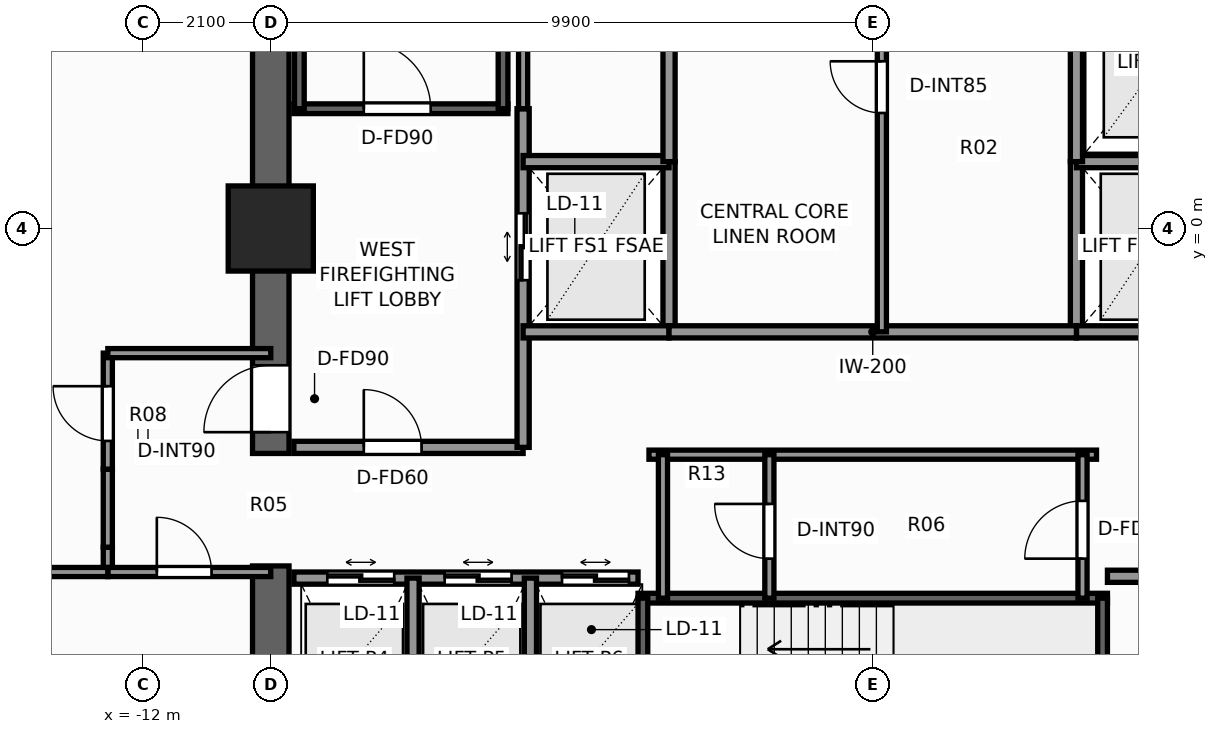
"""IFC4 building model, lengths in metres.
Left out: names, types, materials, properties, quantities, classifications, styles, units other than length and angle.
Written with IfcOpenShell. Run it as: python <this file> out.ifc"""

import sys

from ifc_helpers import new_model, si_unit, direction, frame, frame_2d, origin, origin_2d, place, context, subcontext, project, spatial, rectangle, extrude, element, fill, save


model = new_model("IFC4")
c1 = context("Model", 3, precision=1e-05, world=origin(), true_north=direction((0.0, 1.0)))
c2 = subcontext(c1, "Body", "Model", "MODEL_VIEW")
j1 = project(units=[si_unit("LENGTHUNIT", "METRE"), si_unit("PLANEANGLEUNIT", "RADIAN")], contexts=[c1])
p1 = place(None, origin())
s1 = spatial("IfcSite", under=j1, at=p1, CompositionType="ELEMENT")
p2 = place(p1, origin())
s2 = spatial("IfcBuilding", under=s1, at=p2, CompositionType="ELEMENT")
p3 = place(p2, frame((0.0, 0.0, 85.4)))
s3 = spatial("IfcBuildingStorey", under=s2, at=p3, CompositionType="ELEMENT", Elevation=85.4)
p4 = place(p3, frame((-9.9, -9.6, 0.0), z_axis=(0.0, 0.0, 1.0), x_axis=(0.0, 1.0, 0.0)))
e1 = element("IfcWall", 1, at=p4, inside=s3, PredefinedType="SHEAR", context=c2, shape_type="SweptSolid", body=[
    extrude(rectangle(XDim=4.05, YDim=0.6, at=frame_2d((2.025, 0.0))), origin(), (0.0, 0.0, 1.0), 3.3),
])
p5 = place(p3, frame((-9.9, -3.7, 0.0), z_axis=(0.0, 0.0, 1.0), x_axis=(0.0, 1.0, 0.0)))
e2 = element("IfcWall", 2, at=p5, inside=s3, PredefinedType="SHEAR", context=c2, shape_type="SweptSolid", body=[
    extrude(rectangle(XDim=13.3, YDim=0.6, at=frame_2d((6.65, 0.0))), origin(), (0.0, 0.0, 1.0), 3.3),
])
p6 = place(p5, frame((0.35, 0.0, 0.0)))
e3 = element("IfcOpeningElement", 3, at=p6, cuts=e2, PredefinedType="OPENING", context=c2, shape_type="SweptSolid", body=[
    extrude(rectangle(XDim=1.1, YDim=2.2, at=frame_2d((0.55, 1.1))), frame((0.0, 0.31, 0.0), z_axis=(0.0, -1.0, 0.0), x_axis=(1.0, 0.0, 0.0)), (0.0, 0.0, 1.0), 0.62),
])
p7 = place(p3, frame((-9.9, 0.0, 0.0), z_axis=(0.0, 0.0, 1.0), x_axis=(1.0, 0.0, 0.0)))
e4 = element("IfcColumn", 4, at=p7, inside=s3, PredefinedType="COLUMN", context=c2, shape_type="SweptSolid", body=[
    extrude(rectangle(XDim=1.4, YDim=1.4, at=origin_2d()), origin(), (0.0, 0.0, 1.0), 3.3),
])
p8 = place(p3, frame((-9.52, 1.97, 0.0), z_axis=(0.0, 0.0, 1.0), x_axis=(1.0, 0.0, 0.0)))
e5 = element("IfcWall", 5, at=p8, inside=s3, PredefinedType="SHEAR", context=c2, shape_type="SweptSolid", body=[
    extrude(rectangle(XDim=3.52, YDim=0.16, at=frame_2d((1.76, 0.0))), origin(), (0.0, 0.0, 1.0), 3.3),
])
p9 = place(p8, frame((1.15, 0.0, 0.0)))
e6 = element("IfcOpeningElement", 6, at=p9, cuts=e5, PredefinedType="OPENING", context=c2, shape_type="SweptSolid", body=[
    extrude(rectangle(XDim=1.1, YDim=2.2, at=frame_2d((0.55, 1.1))), frame((0.0, 0.09, 0.0), z_axis=(0.0, -1.0, 0.0), x_axis=(1.0, 0.0, 0.0)), (0.0, 0.0, 1.0), 0.18),
])
for number, where, z_axis, x_axis in (
    (7, (-9.43, 1.97, 0.0), (0.0, 0.0, 1.0), (0.0, 1.0, 0.0)),
    (8, (-6.08, 1.97, 0.0), (0.0, 0.0, 1.0), (0.0, 1.0, 0.0)),
):
    element("IfcWall", number, at=place(p3, frame(where, z_axis=z_axis, x_axis=x_axis)), inside=s3, PredefinedType="SHEAR", context=c2, shape_type="SweptSolid", body=[
        extrude(rectangle(XDim=7.56, YDim=0.16, at=frame_2d((3.78, 0.0))), origin(), (0.0, 0.0, 1.0), 3.3),
    ])
p10 = place(p3, frame((-3.86, -6.08, 0.0), z_axis=(0.0, 0.0, 1.0), x_axis=(1.0, 0.0, 0.0)))
e9 = element("IfcWall", 9, at=p10, inside=s3, PredefinedType="SHEAR", context=c2, shape_type="SweptSolid", body=[
    extrude(rectangle(XDim=7.72, YDim=0.16, at=frame_2d((3.86, 0.0))), origin(), (0.0, 0.0, 1.0), 3.3),
])
for number, where, z_axis, x_axis in (
    (10, (-3.78, -9.43, 0.0), (0.0, 0.0, 1.0), (0.0, 1.0, 0.0)),
    (11, (3.78, -9.43, 0.0), (0.0, 0.0, 1.0), (0.0, 1.0, 0.0)),
):
    element("IfcWall", number, at=place(p3, frame(where, z_axis=z_axis, x_axis=x_axis)), inside=s3, PredefinedType="SHEAR", context=c2, shape_type="SweptSolid", body=[
        extrude(rectangle(XDim=3.35, YDim=0.16, at=frame_2d((1.675, 0.0))), origin(), (0.0, 0.0, 1.0), 3.3),
    ])
p11 = place(p3, frame((-9.52, -3.6, 0.0), z_axis=(0.0, 0.0, 1.0), x_axis=(1.0, 0.0, 0.0)))
e12 = element("IfcWall", 12, at=p11, inside=s3, PredefinedType="SOLIDWALL", context=c2, shape_type="SweptSolid", body=[
    extrude(rectangle(XDim=3.77, YDim=0.2, at=frame_2d((1.885, 0.0))), origin(), (0.0, 0.0, 1.0), 3.08),
])
p12 = place(p11, frame((1.15, 0.0, 0.0)))
e13 = element("IfcOpeningElement", 13, at=p12, cuts=e12, PredefinedType="OPENING", context=c2, shape_type="SweptSolid", body=[
    extrude(rectangle(XDim=0.95, YDim=2.06, at=frame_2d((0.475, 1.03))), frame((0.0, 0.11, 0.0), z_axis=(0.0, -1.0, 0.0), x_axis=(1.0, 0.0, 0.0)), (0.0, 0.0, 1.0), 0.22),
])
p13 = place(p3, frame((-5.75, -3.6, 0.0), z_axis=(0.0, 0.0, 1.0), x_axis=(0.0, 1.0, 0.0)))
e14 = element("IfcWall", 14, at=p13, inside=s3, PredefinedType="SOLIDWALL", context=c2, shape_type="SweptSolid", body=[
    extrude(rectangle(XDim=5.57, YDim=0.2, at=frame_2d((2.785, 0.0))), origin(), (0.0, 0.0, 1.0), 3.08),
])
p14 = place(p13, frame((2.75, 0.0, 0.0)))
e15 = element("IfcOpeningElement", 15, at=p14, cuts=e14, PredefinedType="OPENING", context=c2, shape_type="SweptSolid", body=[
    extrude(rectangle(XDim=1.1, YDim=2.2, at=frame_2d((0.55, 1.1))), frame((0.0, 0.11, 0.0), z_axis=(0.0, -1.0, 0.0), x_axis=(1.0, 0.0, 0.0)), (0.0, 0.0, 1.0), 0.22),
])
p15 = place(p3, frame((-3.35, -1.7, 0.0), z_axis=(0.0, 0.0, 1.0), x_axis=(0.0, 1.0, 0.0)))
e16 = element("IfcWall", 16, at=p15, inside=s3, PredefinedType="SOLIDWALL", context=c2, shape_type="SweptSolid", body=[
    extrude(rectangle(XDim=2.8, YDim=0.2, at=frame_2d((1.4, 0.0))), origin(), (0.0, 0.0, 1.0), 3.08),
])
for number, where, z_axis, x_axis in (
    (17, (-5.75, -1.7, 0.0), (0.0, 0.0, 1.0), (1.0, 0.0, 0.0)),
    (18, (-5.75, 1.1, 0.0), (0.0, 0.0, 1.0), (1.0, 0.0, 0.0)),
):
    element("IfcWall", number, at=place(p3, frame(where, z_axis=z_axis, x_axis=x_axis)), inside=s3, PredefinedType="SOLIDWALL", context=c2, shape_type="SweptSolid", body=[
        extrude(rectangle(XDim=2.4, YDim=0.2, at=frame_2d((1.2, 0.0))), origin(), (0.0, 0.0, 1.0), 3.08),
    ])
p16 = place(p3, frame((3.35, -1.7, 0.0), z_axis=(0.0, 0.0, 1.0), x_axis=(0.0, 1.0, 0.0)))
e19 = element("IfcWall", 19, at=p16, inside=s3, PredefinedType="SOLIDWALL", context=c2, shape_type="SweptSolid", body=[
    extrude(rectangle(XDim=2.8, YDim=0.2, at=frame_2d((1.4, 0.0))), origin(), (0.0, 0.0, 1.0), 3.08),
])
for number, where, z_axis, x_axis in (
    (20, (3.35, -1.7, 0.0), (0.0, 0.0, 1.0), (1.0, 0.0, 0.0)),
    (21, (3.35, 1.1, 0.0), (0.0, 0.0, 1.0), (1.0, 0.0, 0.0)),
):
    element("IfcWall", number, at=place(p3, frame(where, z_axis=z_axis, x_axis=x_axis)), inside=s3, PredefinedType="SOLIDWALL", context=c2, shape_type="SweptSolid", body=[
        extrude(rectangle(XDim=2.4, YDim=0.2, at=frame_2d((1.2, 0.0))), origin(), (0.0, 0.0, 1.0), 3.08),
    ])
p17 = place(p3, frame((-9.52, -5.75, 0.0), z_axis=(0.0, 0.0, 1.0), x_axis=(1.0, 0.0, 0.0)))
e22 = element("IfcWall", 22, at=p17, inside=s3, PredefinedType="SOLIDWALL", context=c2, shape_type="SweptSolid", body=[
    extrude(rectangle(XDim=5.66, YDim=0.2, at=frame_2d((2.83, 0.0))), origin(), (0.0, 0.0, 1.0), 3.08),
])
p18 = place(p17, frame((0.55, 0.0, 0.0)))
e23 = element("IfcOpeningElement", 23, at=p18, cuts=e22, PredefinedType="OPENING", context=c2, shape_type="SweptSolid", body=[
    extrude(rectangle(XDim=1.1, YDim=2.2, at=frame_2d((0.55, 1.1))), frame((0.0, 0.11, 0.0), z_axis=(0.0, -1.0, 0.0), x_axis=(1.0, 0.0, 0.0)), (0.0, 0.0, 1.0), 0.22),
])
p19 = place(p17, frame((2.48, 0.0, 0.0)))
e24 = element("IfcOpeningElement", 24, at=p19, cuts=e22, PredefinedType="OPENING", context=c2, shape_type="SweptSolid", body=[
    extrude(rectangle(XDim=1.1, YDim=2.2, at=frame_2d((0.55, 1.1))), frame((0.0, 0.11, 0.0), z_axis=(0.0, -1.0, 0.0), x_axis=(1.0, 0.0, 0.0)), (0.0, 0.0, 1.0), 0.22),
])
p20 = place(p17, frame((4.41, 0.0, 0.0)))
e25 = element("IfcOpeningElement", 25, at=p20, cuts=e22, PredefinedType="OPENING", context=c2, shape_type="SweptSolid", body=[
    extrude(rectangle(XDim=1.1, YDim=2.2, at=frame_2d((0.55, 1.1))), frame((0.0, 0.11, 0.0), z_axis=(0.0, -1.0, 0.0), x_axis=(1.0, 0.0, 0.0)), (0.0, 0.0, 1.0), 0.22),
])
for number, where, z_axis, x_axis in (
    (26, (-7.56, -9.52, 0.0), (0.0, 0.0, 1.0), (0.0, 1.0, 0.0)),
    (27, (-5.63, -9.52, 0.0), (0.0, 0.0, 1.0), (0.0, 1.0, 0.0)),
):
    element("IfcWall", number, at=place(p3, frame(where, z_axis=z_axis, x_axis=x_axis)), inside=s3, PredefinedType="SOLIDWALL", context=c2, shape_type="SweptSolid", body=[
        extrude(rectangle(XDim=3.77, YDim=0.2, at=frame_2d((1.885, 0.0))), origin(), (0.0, 0.0, 1.0), 3.08),
    ])
p21 = place(p3, frame((3.86, -5.72, 0.0), z_axis=(0.0, 0.0, 1.0), x_axis=(1.0, 0.0, 0.0)))
e28 = element("IfcWall", 28, at=p21, inside=s3, PredefinedType="SOLIDWALL", context=c2, shape_type="SweptSolid", body=[
    extrude(rectangle(XDim=5.66, YDim=0.2, at=frame_2d((2.83, 0.0))), origin(), (0.0, 0.0, 1.0), 3.08),
])
p22 = place(p21, frame((1.2, 0.0, 0.0)))
e29 = element("IfcOpeningElement", 29, at=p22, cuts=e28, PredefinedType="OPENING", context=c2, shape_type="SweptSolid", body=[
    extrude(rectangle(XDim=0.95, YDim=2.06, at=frame_2d((0.475, 1.03))), frame((0.0, 0.11, 0.0), z_axis=(0.0, -1.0, 0.0), x_axis=(1.0, 0.0, 0.0)), (0.0, 0.0, 1.0), 0.22),
])
p23 = place(p3, frame((-3.35, -1.7, 0.0), z_axis=(0.0, 0.0, 1.0), x_axis=(1.0, 0.0, 0.0)))
e30 = element("IfcWall", 30, at=p23, inside=s3, PredefinedType="SOLIDWALL", context=c2, shape_type="SweptSolid", body=[
    extrude(rectangle(XDim=6.7, YDim=0.2, at=frame_2d((3.35, 0.0))), origin(), (0.0, 0.0, 1.0), 3.08),
])
for number, where, z_axis, x_axis in (
    (31, (-3.35, 1.1, 0.0), (0.0, 0.0, 1.0), (0.0, 1.0, 0.0)),
    (32, (3.35, 1.1, 0.0), (0.0, 0.0, 1.0), (0.0, 1.0, 0.0)),
):
    element("IfcWall", number, at=place(p3, frame(where, z_axis=z_axis, x_axis=x_axis)), inside=s3, PredefinedType="SOLIDWALL", context=c2, shape_type="SweptSolid", body=[
        extrude(rectangle(XDim=3.2, YDim=0.2, at=frame_2d((1.6, 0.0))), origin(), (0.0, 0.0, 1.0), 3.08),
    ])
p24 = place(p3, frame((0.15, -1.7, 0.0), z_axis=(0.0, 0.0, 1.0), x_axis=(0.0, 1.0, 0.0)))
e33 = element("IfcWall", 33, at=p24, inside=s3, PredefinedType="PARTITIONING", context=c2, shape_type="SweptSolid", body=[
    extrude(rectangle(XDim=6.0, YDim=0.15, at=frame_2d((3.0, 0.0))), origin(), (0.0, 0.0, 1.0), 3.08),
])
p25 = place(p24, frame((3.6, 0.0, 0.0)))
e34 = element("IfcOpeningElement", 34, at=p25, cuts=e33, PredefinedType="OPENING", context=c2, shape_type="SweptSolid", body=[
    extrude(rectangle(XDim=0.85, YDim=2.03, at=frame_2d((0.425, 1.015))), frame((0.0, 0.085, 0.0), z_axis=(0.0, -1.0, 0.0), x_axis=(1.0, 0.0, 0.0)), (0.0, 0.0, 1.0), 0.17),
])
p26 = place(p3, frame((-3.68, -3.72, 0.0), z_axis=(0.0, 0.0, 1.0), x_axis=(1.0, 0.0, 0.0)))
e35 = element("IfcWall", 35, at=p26, inside=s3, PredefinedType="PARTITIONING", context=c2, shape_type="SweptSolid", body=[
    extrude(rectangle(XDim=7.36, YDim=0.15, at=frame_2d((3.68, 0.0))), origin(), (0.0, 0.0, 1.0), 3.08),
])
p27 = place(p3, frame((3.45, -6.08, 0.0), z_axis=(0.0, 0.0, 1.0), x_axis=(0.0, 1.0, 0.0)))
e36 = element("IfcWall", 36, at=p27, inside=s3, PredefinedType="PARTITIONING", context=c2, shape_type="SweptSolid", body=[
    extrude(rectangle(XDim=2.36, YDim=0.15, at=frame_2d((1.18, 0.0))), origin(), (0.0, 0.0, 1.0), 3.08),
])
p28 = place(p27, frame((0.65, 0.0, 0.0)))
e37 = element("IfcOpeningElement", 37, at=p28, cuts=e36, PredefinedType="OPENING", context=c2, shape_type="SweptSolid", body=[
    extrude(rectangle(XDim=0.95, YDim=2.06, at=frame_2d((0.475, 1.03))), frame((0.0, 0.085, 0.0), z_axis=(0.0, -1.0, 0.0), x_axis=(1.0, 0.0, 0.0)), (0.0, 0.0, 1.0), 0.17),
])
p29 = place(p3, frame((-3.45, -6.08, 0.0), z_axis=(0.0, 0.0, 1.0), x_axis=(0.0, 1.0, 0.0)))
e38 = element("IfcWall", 38, at=p29, inside=s3, PredefinedType="PARTITIONING", context=c2, shape_type="SweptSolid", body=[
    extrude(rectangle(XDim=2.36, YDim=0.15, at=frame_2d((1.18, 0.0))), origin(), (0.0, 0.0, 1.0), 3.08),
])
p30 = place(p3, frame((-1.7, -6.08, 0.0), z_axis=(0.0, 0.0, 1.0), x_axis=(0.0, 1.0, 0.0)))
e39 = element("IfcWall", 39, at=p30, inside=s3, PredefinedType="PARTITIONING", context=c2, shape_type="SweptSolid", body=[
    extrude(rectangle(XDim=2.36, YDim=0.15, at=frame_2d((1.18, 0.0))), origin(), (0.0, 0.0, 1.0), 3.08),
])
p31 = place(p30, frame((0.65, 0.0, 0.0)))
e40 = element("IfcOpeningElement", 40, at=p31, cuts=e39, PredefinedType="OPENING", context=c2, shape_type="SweptSolid", body=[
    extrude(rectangle(XDim=0.9, YDim=2.06, at=frame_2d((0.45, 1.03))), frame((0.0, 0.085, 0.0), z_axis=(0.0, -1.0, 0.0), x_axis=(1.0, 0.0, 0.0)), (0.0, 0.0, 1.0), 0.17),
])
p32 = place(p3, frame((-5.75, 1.97, 0.0), z_axis=(0.0, 0.0, 1.0), x_axis=(0.0, 1.0, 0.0)))
e41 = element("IfcWall", 41, at=p32, inside=s3, PredefinedType="PARTITIONING", context=c2, shape_type="SweptSolid", body=[
    extrude(rectangle(XDim=2.33, YDim=0.15, at=frame_2d((1.165, 0.0))), origin(), (0.0, 0.0, 1.0), 3.08),
])
p33 = place(p3, frame((-12.58, -5.65, 0.0), z_axis=(0.0, 0.0, 1.0), x_axis=(0.0, 1.0, 0.0)))
e42 = element("IfcWall", 42, at=p33, inside=s3, PredefinedType="PARTITIONING", context=c2, shape_type="SweptSolid", body=[
    extrude(rectangle(XDim=0.408, YDim=0.15, at=frame_2d((0.204, 0.0))), origin(), (0.0, 0.0, 1.0), 3.08),
])
p34 = place(p3, frame((-12.58, -5.242, 0.0), z_axis=(0.0, 0.0, 1.0), x_axis=(0.0, 1.0, 0.0)))
e43 = element("IfcWall", 43, at=p34, inside=s3, PredefinedType="PARTITIONING", context=c2, shape_type="SweptSolid", body=[
    extrude(rectangle(XDim=1.284, YDim=0.15, at=frame_2d((0.642, 0.0))), origin(), (0.0, 0.0, 1.0), 1.265),
])
p35 = place(p3, frame((-12.58, -3.958, 0.0), z_axis=(0.0, 0.0, 1.0), x_axis=(0.0, 1.0, 0.0)))
e44 = element("IfcWall", 44, at=p35, inside=s3, PredefinedType="PARTITIONING", context=c2, shape_type="SweptSolid", body=[
    extrude(rectangle(XDim=1.908, YDim=0.15, at=frame_2d((0.954, 0.0))), origin(), (0.0, 0.0, 1.0), 2.369),
])
p36 = place(p35, frame((0.464, 0.0, 0.0)))
e45 = element("IfcOpeningElement", 45, at=p36, cuts=e44, PredefinedType="OPENING", context=c2, shape_type="SweptSolid", body=[
    extrude(rectangle(XDim=0.9, YDim=2.06, at=frame_2d((0.45, 1.03))), frame((0.0, 0.085, 0.0), z_axis=(0.0, -1.0, 0.0), x_axis=(1.0, 0.0, 0.0)), (0.0, 0.0, 1.0), 0.17),
])
p37 = place(p3, frame((-12.58, -2.05, 0.0), z_axis=(0.0, 0.0, 1.0), x_axis=(1.0, 0.0, 0.0)))
e46 = element("IfcWall", 46, at=p37, inside=s3, PredefinedType="PARTITIONING", context=c2, shape_type="SweptSolid", body=[
    extrude(rectangle(XDim=2.68, YDim=0.15, at=frame_2d((1.34, 0.0))), origin(), (0.0, 0.0, 1.0), 3.08),
])
p38 = place(p3, frame((-12.58, -5.65, 0.0), z_axis=(0.0, 0.0, 1.0), x_axis=(1.0, 0.0, 0.0)))
e47 = element("IfcWall", 47, at=p38, inside=s3, PredefinedType="PARTITIONING", context=c2, shape_type="SweptSolid", body=[
    extrude(rectangle(XDim=2.68, YDim=0.15, at=frame_2d((1.34, 0.0))), origin(), (0.0, 0.0, 1.0), 3.08),
])
p39 = place(p38, frame((0.806, 0.0, 0.0)))
e48 = element("IfcOpeningElement", 48, at=p39, cuts=e47, PredefinedType="OPENING", context=c2, shape_type="SweptSolid", body=[
    extrude(rectangle(XDim=0.9, YDim=2.06, at=frame_2d((0.45, 1.03))), frame((0.0, 0.085, 0.0), z_axis=(0.0, -1.0, 0.0), x_axis=(1.0, 0.0, 0.0)), (0.0, 0.0, 1.0), 0.17),
])
p40 = place(p3, frame((-20.38, -5.65, 0.0), z_axis=(0.0, 0.0, 1.0), x_axis=(1.0, 0.0, 0.0)))
e49 = element("IfcWall", 49, at=p40, inside=s3, PredefinedType="PARTITIONING", context=c2, shape_type="SweptSolid", body=[
    extrude(rectangle(XDim=7.8, YDim=0.15, at=frame_2d((3.9, 0.0))), origin(), (0.0, 0.0, 1.0), 2.449),
])
p41 = place(p9, origin())
e50 = element("IfcDoor", 50, at=p41, inside=s3, OperationType="SINGLE_SWING_LEFT", PredefinedType="DOOR", context=c2, shape_type="SweptSolid", body=[
    extrude(rectangle(XDim=1.1, YDim=2.2, at=frame_2d((0.55, 1.1))), frame((0.0, 0.025, 0.0), z_axis=(0.0, -1.0, 0.0), x_axis=(1.0, 0.0, 0.0)), (0.0, 0.0, 1.0), 0.05),
])
fill(e6, e50)
p42 = place(p6, origin())
e51 = element("IfcDoor", 51, at=p42, inside=s3, OperationType="SINGLE_SWING_LEFT", PredefinedType="DOOR", context=c2, shape_type="SweptSolid", body=[
    extrude(rectangle(XDim=1.1, YDim=2.2, at=frame_2d((0.55, 1.1))), frame((0.0, 0.025, 0.0), z_axis=(0.0, -1.0, 0.0), x_axis=(1.0, 0.0, 0.0)), (0.0, 0.0, 1.0), 0.05),
])
fill(e3, e51)
p43 = place(p14, origin())
e52 = element("IfcDoor", 52, at=p43, inside=s3, OperationType="DOUBLE_DOOR_SLIDING", PredefinedType="DOOR", context=c2, shape_type="SweptSolid", body=[
    extrude(rectangle(XDim=1.1, YDim=2.2, at=frame_2d((0.55, 1.1))), frame((0.0, 0.025, 0.0), z_axis=(0.0, -1.0, 0.0), x_axis=(1.0, 0.0, 0.0)), (0.0, 0.0, 1.0), 0.05),
])
fill(e15, e52)
p44 = place(p18, origin())
e53 = element("IfcDoor", 53, at=p44, inside=s3, OperationType="DOUBLE_DOOR_SLIDING", PredefinedType="DOOR", context=c2, shape_type="SweptSolid", body=[
    extrude(rectangle(XDim=1.1, YDim=2.2, at=frame_2d((0.55, 1.1))), frame((0.0, 0.025, 0.0), z_axis=(0.0, -1.0, 0.0), x_axis=(1.0, 0.0, 0.0)), (0.0, 0.0, 1.0), 0.05),
])
fill(e23, e53)
p45 = place(p19, origin())
e54 = element("IfcDoor", 54, at=p45, inside=s3, OperationType="DOUBLE_DOOR_SLIDING", PredefinedType="DOOR", context=c2, shape_type="SweptSolid", body=[
    extrude(rectangle(XDim=1.1, YDim=2.2, at=frame_2d((0.55, 1.1))), frame((0.0, 0.025, 0.0), z_axis=(0.0, -1.0, 0.0), x_axis=(1.0, 0.0, 0.0)), (0.0, 0.0, 1.0), 0.05),
])
fill(e24, e54)
p46 = place(p20, origin())
e55 = element("IfcDoor", 55, at=p46, inside=s3, OperationType="DOUBLE_DOOR_SLIDING", PredefinedType="DOOR", context=c2, shape_type="SweptSolid", body=[
    extrude(rectangle(XDim=1.1, YDim=2.2, at=frame_2d((0.55, 1.1))), frame((0.0, 0.025, 0.0), z_axis=(0.0, -1.0, 0.0), x_axis=(1.0, 0.0, 0.0)), (0.0, 0.0, 1.0), 0.05),
])
fill(e25, e55)
p47 = place(p12, origin())
e56 = element("IfcDoor", 56, at=p47, inside=s3, OperationType="SINGLE_SWING_LEFT", PredefinedType="DOOR", context=c2, shape_type="SweptSolid", body=[
    extrude(rectangle(XDim=0.95, YDim=2.06, at=frame_2d((0.475, 1.03))), frame((0.0, 0.025, 0.0), z_axis=(0.0, -1.0, 0.0), x_axis=(1.0, 0.0, 0.0)), (0.0, 0.0, 1.0), 0.05),
])
fill(e13, e56)
p48 = place(p25, origin())
e57 = element("IfcDoor", 57, at=p48, inside=s3, OperationType="SINGLE_SWING_RIGHT", PredefinedType="DOOR", context=c2, shape_type="SweptSolid", body=[
    extrude(rectangle(XDim=0.85, YDim=2.03, at=frame_2d((0.425, 1.015))), frame((0.0, 0.025, 0.0), z_axis=(0.0, -1.0, 0.0), x_axis=(1.0, 0.0, 0.0)), (0.0, 0.0, 1.0), 0.05),
])
fill(e34, e57)
p49 = place(p28, origin())
e58 = element("IfcDoor", 58, at=p49, inside=s3, OperationType="SINGLE_SWING_LEFT", PredefinedType="DOOR", context=c2, shape_type="SweptSolid", body=[
    extrude(rectangle(XDim=0.95, YDim=2.06, at=frame_2d((0.475, 1.03))), frame((0.0, 0.025, 0.0), z_axis=(0.0, -1.0, 0.0), x_axis=(1.0, 0.0, 0.0)), (0.0, 0.0, 1.0), 0.05),
])
fill(e37, e58)
p50 = place(p31, origin())
e59 = element("IfcDoor", 59, at=p50, inside=s3, OperationType="SINGLE_SWING_RIGHT", PredefinedType="DOOR", context=c2, shape_type="SweptSolid", body=[
    extrude(rectangle(XDim=0.9, YDim=2.06, at=frame_2d((0.45, 1.03))), frame((0.0, 0.025, 0.0), z_axis=(0.0, -1.0, 0.0), x_axis=(1.0, 0.0, 0.0)), (0.0, 0.0, 1.0), 0.05),
])
fill(e40, e59)
p51 = place(p36, origin())
e60 = element("IfcDoor", 60, at=p51, inside=s3, OperationType="SINGLE_SWING_RIGHT", PredefinedType="DOOR", context=c2, shape_type="SweptSolid", body=[
    extrude(rectangle(XDim=0.9, YDim=2.06, at=frame_2d((0.45, 1.03))), frame((0.0, 0.025, 0.0), z_axis=(0.0, -1.0, 0.0), x_axis=(1.0, 0.0, 0.0)), (0.0, 0.0, 1.0), 0.05),
])
fill(e45, e60)
p52 = place(p39, origin())
e61 = element("IfcDoor", 61, at=p52, inside=s3, OperationType="SINGLE_SWING_LEFT", PredefinedType="DOOR", context=c2, shape_type="SweptSolid", body=[
    extrude(rectangle(XDim=0.9, YDim=2.06, at=frame_2d((0.45, 1.03))), frame((0.0, 0.025, 0.0), z_axis=(0.0, -1.0, 0.0), x_axis=(1.0, 0.0, 0.0)), (0.0, 0.0, 1.0), 0.05),
])
fill(e48, e61)
save(model, sys.argv[1])
